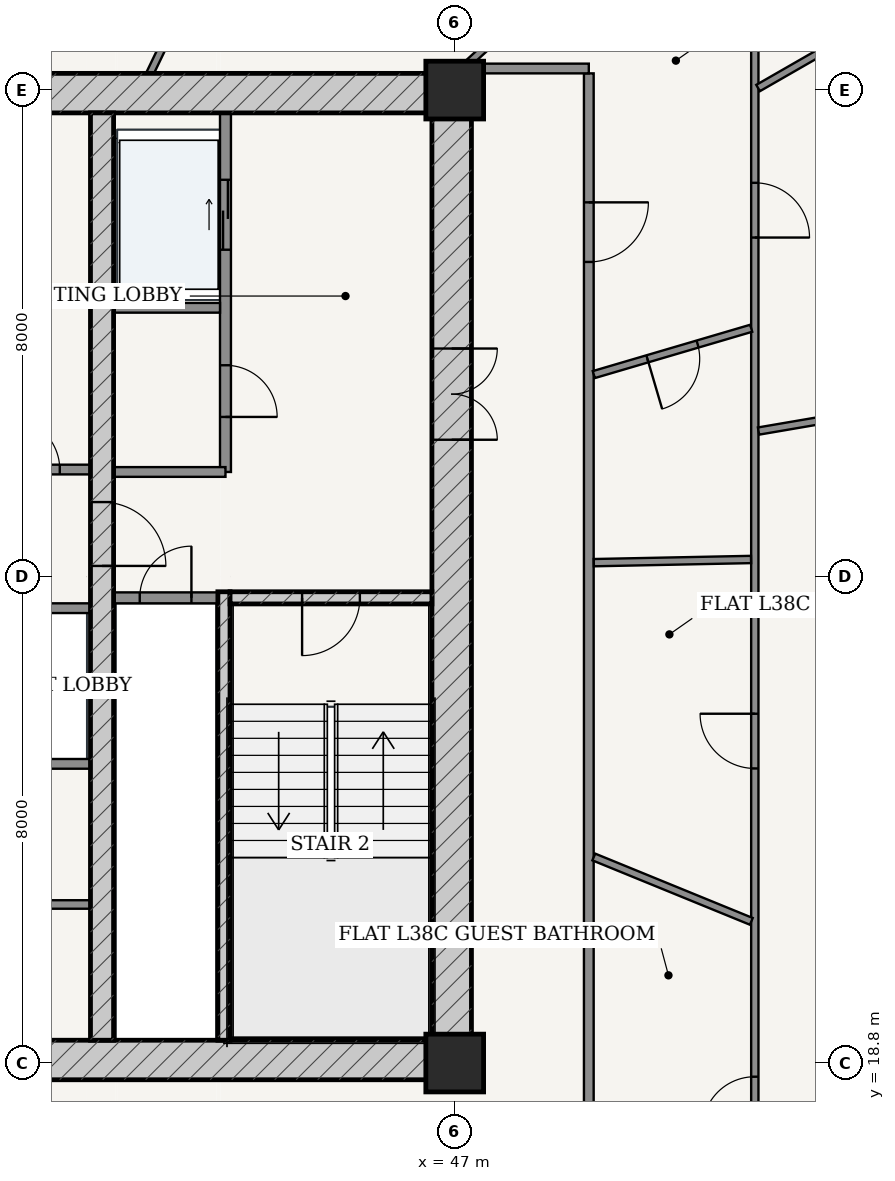
"""IFC4 building model, lengths in metres.
Left out: names, types, materials, properties, quantities, classifications, styles, units other than length and angle.
Written with IfcOpenShell. Run it as: python <this file> out.ifc"""

import sys

from ifc_helpers import new_model, si_unit, direction, frame, frame_2d, origin, origin_2d, place, context, subcontext, project, spatial, rectangle, extrude, source, transform, mapped, element, fill, save


model = new_model("IFC4")
c1 = context("Model", 3, precision=1e-05, world=origin(), true_north=direction((-0.2419218956, 0.970295726276)))
c2 = subcontext(c1, "Body", "Model", "MODEL_VIEW")
j1 = project(units=[si_unit("LENGTHUNIT", "METRE"), si_unit("PLANEANGLEUNIT", "RADIAN")], contexts=[c1])
p1 = place(None, origin())
s1 = spatial("IfcSite", under=j1, at=p1, CompositionType="ELEMENT")
p2 = place(p1, origin())
s2 = spatial("IfcBuilding", under=s1, at=p2, CompositionType="ELEMENT")
p3 = place(p2, frame((0.0, 0.0, 146.2)))
s3 = spatial("IfcBuildingStorey", under=s2, at=p3, CompositionType="ELEMENT", Elevation=146.2)
for number, where, z_axis, x_axis in (
    (1, (47.0, 18.8, 0.0), (0.0, 0.0, 1.0), (1.0, 0.0, 0.0)),
    (2, (47.0, 34.8, 0.0), (0.0, 0.0, 1.0), (1.0, 0.0, 0.0)),
):
    element("IfcColumn", number, at=place(p3, frame(where, z_axis=z_axis, x_axis=x_axis)), inside=s3, PredefinedType="COLUMN", context=c2, shape_type="SweptSolid", body=[
        extrude(rectangle(XDim=0.95, YDim=0.95, at=origin_2d()), origin(), (0.0, 0.0, 1.0), 3.6),
    ])
p4 = place(p3, frame((28.725, 18.85, 0.0), z_axis=(0.0, 0.0, 1.0), x_axis=(1.0, 0.0, 0.0)))
e3 = element("IfcWall", 3, at=p4, inside=s3, PredefinedType="SHEAR", context=c2, shape_type="SweptSolid", body=[
    extrude(rectangle(XDim=18.55, YDim=0.65, at=frame_2d((9.275, 0.0))), origin(), (0.0, 0.0, 1.0), 3.33),
])
p5 = place(p4, frame((7.51, 0.0, 0.0)))
e4 = element("IfcOpeningElement", 4, at=p5, cuts=e3, PredefinedType="OPENING", context=c2, shape_type="SweptSolid", body=[
    extrude(rectangle(XDim=0.85, YDim=2.1, at=frame_2d((0.425, 1.05))), frame((0.0, 0.335, 0.0), z_axis=(0.0, -1.0, 0.0), x_axis=(1.0, 0.0, 0.0)), (0.0, 0.0, 1.0), 0.67),
])
p6 = place(p4, frame((10.59, 0.0, 0.0)))
e5 = element("IfcOpeningElement", 5, at=p6, cuts=e3, PredefinedType="OPENING", context=c2, shape_type="SweptSolid", body=[
    extrude(rectangle(XDim=0.85, YDim=2.1, at=frame_2d((0.425, 1.05))), frame((0.0, 0.335, 0.0), z_axis=(0.0, -1.0, 0.0), x_axis=(1.0, 0.0, 0.0)), (0.0, 0.0, 1.0), 0.67),
])
p7 = place(p3, frame((28.725, 34.75, 0.0), z_axis=(0.0, 0.0, 1.0), x_axis=(1.0, 0.0, 0.0)))
e6 = element("IfcWall", 6, at=p7, inside=s3, PredefinedType="SHEAR", context=c2, shape_type="SweptSolid", body=[
    extrude(rectangle(XDim=18.55, YDim=0.65, at=frame_2d((9.275, 0.0))), origin(), (0.0, 0.0, 1.0), 3.33),
])
p8 = place(p3, frame((46.95, 19.175, 0.0), z_axis=(0.0, 0.0, 1.0), x_axis=(0.0, 1.0, 0.0)))
e7 = element("IfcWall", 7, at=p8, inside=s3, PredefinedType="SHEAR", context=c2, shape_type="SweptSolid", body=[
    extrude(rectangle(XDim=15.25, YDim=0.65, at=frame_2d((7.625, 0.0))), origin(), (0.0, 0.0, 1.0), 3.33),
])
p9 = place(p8, frame((9.875, 0.0, 0.0)))
e8 = element("IfcOpeningElement", 8, at=p9, cuts=e7, PredefinedType="OPENING", context=c2, shape_type="SweptSolid", body=[
    extrude(rectangle(XDim=1.5, YDim=2.2, at=frame_2d((0.75, 1.1))), frame((0.0, 0.335, 0.0), z_axis=(0.0, -1.0, 0.0), x_axis=(1.0, 0.0, 0.0)), (0.0, 0.0, 1.0), 0.67),
])
p10 = place(p3, frame((43.205, 19.175, 0.0), z_axis=(0.0, 0.0, 1.0), x_axis=(0.0, 1.0, 0.0)))
e9 = element("IfcWall", 9, at=p10, inside=s3, PredefinedType="SOLIDWALL", context=c2, shape_type="SweptSolid", body=[
    extrude(rectangle(XDim=7.375, YDim=0.2, at=frame_2d((3.688, 0.0))), origin(), (0.0, 0.0, 1.0), 3.33),
])
p11 = place(p3, frame((43.305, 26.45, 0.0), z_axis=(0.0, 0.0, 1.0), x_axis=(1.0, 0.0, 0.0)))
e10 = element("IfcWall", 10, at=p11, inside=s3, PredefinedType="SOLIDWALL", context=c2, shape_type="SweptSolid", body=[
    extrude(rectangle(XDim=3.32, YDim=0.2, at=frame_2d((1.66, 0.0))), origin(), (0.0, 0.0, 1.0), 3.33),
])
p12 = place(p11, frame((1.185, 0.0, 0.0)))
e11 = element("IfcOpeningElement", 11, at=p12, cuts=e10, PredefinedType="OPENING", context=c2, shape_type="SweptSolid", body=[
    extrude(rectangle(XDim=0.95, YDim=2.15, at=frame_2d((0.475, 1.075))), frame((0.0, 0.11, 0.0), z_axis=(0.0, -1.0, 0.0), x_axis=(1.0, 0.0, 0.0)), (0.0, 0.0, 1.0), 0.22),
])
p13 = place(p3, frame((41.2, 19.175, 0.0), z_axis=(0.0, 0.0, 1.0), x_axis=(0.0, 1.0, 0.0)))
e12 = element("IfcWall", 12, at=p13, inside=s3, PredefinedType="SHEAR", context=c2, shape_type="SweptSolid", body=[
    extrude(rectangle(XDim=15.25, YDim=0.38, at=frame_2d((7.625, 0.0))), origin(), (0.0, 0.0, 1.0), 3.33),
])
p14 = place(p13, frame((7.8, 0.0, 0.0)))
e13 = element("IfcOpeningElement", 13, at=p14, cuts=e12, PredefinedType="OPENING", context=c2, shape_type="SweptSolid", body=[
    extrude(rectangle(XDim=1.05, YDim=2.15, at=frame_2d((0.525, 1.075))), frame((0.0, 0.2, 0.0), z_axis=(0.0, -1.0, 0.0), x_axis=(1.0, 0.0, 0.0)), (0.0, 0.0, 1.0), 0.4),
])
p15 = place(p3, frame((41.39, 26.45, 0.0), z_axis=(0.0, 0.0, 1.0), x_axis=(1.0, 0.0, 0.0)))
e14 = element("IfcWall", 14, at=p15, inside=s3, PredefinedType="PARTITIONING", context=c2, shape_type="SweptSolid", body=[
    extrude(rectangle(XDim=1.71, YDim=0.18, at=frame_2d((0.855, 0.0))), origin(), (0.0, 0.0, 1.0), 3.33),
])
p16 = place(p15, frame((0.43, 0.0, 0.0)))
e15 = element("IfcOpeningElement", 15, at=p16, cuts=e14, PredefinedType="OPENING", context=c2, shape_type="SweptSolid", body=[
    extrude(rectangle(XDim=0.85, YDim=2.1, at=frame_2d((0.425, 1.05))), frame((0.0, 0.1, 0.0), z_axis=(0.0, -1.0, 0.0), x_axis=(1.0, 0.0, 0.0)), (0.0, 0.0, 1.0), 0.2),
])
p17 = place(p3, frame((43.23, 28.52, 0.0), z_axis=(0.0, 0.0, 1.0), x_axis=(0.0, 1.0, 0.0)))
e16 = element("IfcWall", 16, at=p17, inside=s3, PredefinedType="PARTITIONING", context=c2, shape_type="SweptSolid", body=[
    extrude(rectangle(XDim=5.905, YDim=0.18, at=frame_2d((2.953, 0.0))), origin(), (0.0, 0.0, 1.0), 3.33),
])
p18 = place(p17, frame((0.905, 0.0, 0.0)))
e17 = element("IfcOpeningElement", 17, at=p18, cuts=e16, PredefinedType="OPENING", context=c2, shape_type="SweptSolid", body=[
    extrude(rectangle(XDim=0.85, YDim=2.1, at=frame_2d((0.425, 1.05))), frame((0.0, 0.1, 0.0), z_axis=(0.0, -1.0, 0.0), x_axis=(1.0, 0.0, 0.0)), (0.0, 0.0, 1.0), 0.2),
])
p19 = place(p17, frame((3.655, 0.0, 0.0)))
e18 = element("IfcOpeningElement", 18, at=p19, cuts=e16, PredefinedType="OPENING", context=c2, shape_type="SweptSolid", body=[
    extrude(rectangle(XDim=1.15, YDim=2.2, at=frame_2d((0.575, 1.1))), frame((0.0, 0.1, 0.0), z_axis=(0.0, -1.0, 0.0), x_axis=(1.0, 0.0, 0.0)), (0.0, 0.0, 1.0), 0.2),
])
p20 = place(p3, frame((41.39, 31.22, 0.0), z_axis=(0.0, 0.0, 1.0), x_axis=(1.0, 0.0, 0.0)))
e19 = element("IfcWall", 19, at=p20, inside=s3, PredefinedType="PARTITIONING", context=c2, shape_type="SweptSolid", body=[
    extrude(rectangle(XDim=1.75, YDim=0.16, at=frame_2d((0.875, 0.0))), origin(), (0.0, 0.0, 1.0), 3.33),
])
p21 = place(p3, frame((41.39, 28.52, 0.0), z_axis=(0.0, 0.0, 1.0), x_axis=(1.0, 0.0, 0.0)))
e20 = element("IfcWall", 20, at=p21, inside=s3, PredefinedType="PARTITIONING", context=c2, shape_type="SweptSolid", body=[
    extrude(rectangle(XDim=1.84, YDim=0.16, at=frame_2d((0.92, 0.0))), origin(), (0.0, 0.0, 1.0), 3.33),
])
p22 = place(p3, frame((34.99, 28.56, 0.0), z_axis=(0.0, 0.0, 1.0), x_axis=(1.0, 0.0, 0.0)))
e21 = element("IfcWall", 21, at=p22, inside=s3, PredefinedType="PARTITIONING", context=c2, shape_type="SweptSolid", body=[
    extrude(rectangle(XDim=6.02, YDim=0.16, at=frame_2d((3.01, 0.0))), origin(), (0.0, 0.0, 1.0), 3.33),
])
p23 = place(p22, frame((0.505, 0.0, 0.0)))
e22 = element("IfcOpeningElement", 22, at=p23, cuts=e21, PredefinedType="OPENING", context=c2, shape_type="SweptSolid", body=[
    extrude(rectangle(XDim=0.85, YDim=2.1, at=frame_2d((0.425, 1.05))), frame((0.0, 0.09, 0.0), z_axis=(0.0, -1.0, 0.0), x_axis=(1.0, 0.0, 0.0)), (0.0, 0.0, 1.0), 0.18),
])
p24 = place(p22, frame((2.58, 0.0, 0.0)))
e23 = element("IfcOpeningElement", 23, at=p24, cuts=e21, PredefinedType="OPENING", context=c2, shape_type="SweptSolid", body=[
    extrude(rectangle(XDim=0.86, YDim=2.1, at=frame_2d((0.43, 1.05))), frame((0.0, 0.09, 0.0), z_axis=(0.0, -1.0, 0.0), x_axis=(1.0, 0.0, 0.0)), (0.0, 0.0, 1.0), 0.18),
])
p25 = place(p22, frame((4.665, 0.0, 0.0)))
e24 = element("IfcOpeningElement", 24, at=p25, cuts=e21, PredefinedType="OPENING", context=c2, shape_type="SweptSolid", body=[
    extrude(rectangle(XDim=0.85, YDim=2.1, at=frame_2d((0.425, 1.05))), frame((0.0, 0.09, 0.0), z_axis=(0.0, -1.0, 0.0), x_axis=(1.0, 0.0, 0.0)), (0.0, 0.0, 1.0), 0.18),
])
p26 = place(p3, frame((34.99, 26.28, 0.0), z_axis=(0.0, 0.0, 1.0), x_axis=(1.0, 0.0, 0.0)))
e25 = element("IfcWall", 25, at=p26, inside=s3, PredefinedType="PARTITIONING", context=c2, shape_type="SweptSolid", body=[
    extrude(rectangle(XDim=6.02, YDim=0.16, at=frame_2d((3.01, 0.0))), origin(), (0.0, 0.0, 1.0), 3.33),
])
p27 = place(p26, frame((0.225, 0.0, 0.0)))
e26 = element("IfcOpeningElement", 26, at=p27, cuts=e25, PredefinedType="OPENING", context=c2, shape_type="SweptSolid", body=[
    extrude(rectangle(XDim=1.1, YDim=2.2, at=frame_2d((0.55, 1.1))), frame((0.0, 0.09, 0.0), z_axis=(0.0, -1.0, 0.0), x_axis=(1.0, 0.0, 0.0)), (0.0, 0.0, 1.0), 0.18),
])
p28 = place(p26, frame((1.705, 0.0, 0.0)))
e27 = element("IfcOpeningElement", 27, at=p28, cuts=e25, PredefinedType="OPENING", context=c2, shape_type="SweptSolid", body=[
    extrude(rectangle(XDim=1.1, YDim=2.2, at=frame_2d((0.55, 1.1))), frame((0.0, 0.09, 0.0), z_axis=(0.0, -1.0, 0.0), x_axis=(1.0, 0.0, 0.0)), (0.0, 0.0, 1.0), 0.18),
])
p29 = place(p3, frame((34.99, 23.72, 0.0), z_axis=(0.0, 0.0, 1.0), x_axis=(1.0, 0.0, 0.0)))
e28 = element("IfcWall", 28, at=p29, inside=s3, PredefinedType="PARTITIONING", context=c2, shape_type="SweptSolid", body=[
    extrude(rectangle(XDim=6.02, YDim=0.16, at=frame_2d((3.01, 0.0))), origin(), (0.0, 0.0, 1.0), 3.33),
])
p30 = place(p3, frame((38.4, 21.407, 0.0), z_axis=(0.0, 0.0, 1.0), x_axis=(1.0, 0.0, 0.0)))
e29 = element("IfcWall", 29, at=p30, inside=s3, PredefinedType="PARTITIONING", context=c2, shape_type="SweptSolid", body=[
    extrude(rectangle(XDim=2.61, YDim=0.14, at=frame_2d((1.305, 0.0))), origin(), (0.0, 0.0, 1.0), 3.33),
])
p31 = place(p30, frame((0.88, 0.0, 0.0)))
e30 = element("IfcOpeningElement", 30, at=p31, cuts=e29, PredefinedType="OPENING", context=c2, shape_type="SweptSolid", body=[
    extrude(rectangle(XDim=0.85, YDim=2.1, at=frame_2d((0.425, 1.05))), frame((0.0, 0.08, 0.0), z_axis=(0.0, -1.0, 0.0), x_axis=(1.0, 0.0, 0.0)), (0.0, 0.0, 1.0), 0.16),
])
p32 = place(p3, frame((49.205, 16.675, 0.0), z_axis=(0.0, 0.0, 1.0), x_axis=(0.0, 1.0, 0.0)))
e31 = element("IfcWall", 31, at=p32, inside=s3, PredefinedType="PARTITIONING", context=c2, shape_type="SweptSolid", body=[
    extrude(rectangle(XDim=18.4, YDim=0.16, at=frame_2d((9.2, 0.0))), origin(), (0.0, 0.0, 1.0), 2.776),
])
p33 = place(p32, frame((15.299, 0.0, 0.0)))
e32 = element("IfcOpeningElement", 32, at=p33, cuts=e31, PredefinedType="OPENING", context=c2, shape_type="SweptSolid", body=[
    extrude(rectangle(XDim=0.98, YDim=2.2, at=frame_2d((0.49, 1.1))), frame((0.0, 0.09, 0.0), z_axis=(0.0, -1.0, 0.0), x_axis=(1.0, 0.0, 0.0)), (0.0, 0.0, 1.0), 0.18),
])
p34 = place(p3, frame((47.275, 35.155, 0.0), z_axis=(0.0, 0.0, 1.0), x_axis=(1.0, 0.0, 0.0)))
e33 = element("IfcWall", 33, at=p34, inside=s3, PredefinedType="PARTITIONING", context=c2, shape_type="SweptSolid", body=[
    extrude(rectangle(XDim=1.93, YDim=0.16, at=frame_2d((0.965, 0.0))), origin(), (0.0, 0.0, 1.0), 2.776),
])
p35 = place(p3, frame((51.935, 37.885, 0.0), z_axis=(0.0, 0.0, 1.0), x_axis=(0.0, -1.0, 0.0)))
e34 = element("IfcWall", 34, at=p35, inside=s3, PredefinedType="PARTITIONING", context=c2, shape_type="SweptSolid", body=[
    extrude(rectangle(XDim=22.96, YDim=0.12, at=frame_2d((11.48, 0.0))), origin(), (0.0, 0.0, 1.0), 2.776),
])
p36 = place(p35, frame((4.61, 0.0, 0.0)))
e35 = element("IfcOpeningElement", 35, at=p36, cuts=e34, PredefinedType="OPENING", context=c2, shape_type="SweptSolid", body=[
    extrude(rectangle(XDim=0.9, YDim=2.15, at=frame_2d((0.45, 1.075))), frame((0.0, 0.07, 0.0), z_axis=(0.0, -1.0, 0.0), x_axis=(1.0, 0.0, 0.0)), (0.0, 0.0, 1.0), 0.14),
])
p37 = place(p35, frame((19.31, 0.0, 0.0)))
e36 = element("IfcOpeningElement", 36, at=p37, cuts=e34, PredefinedType="OPENING", context=c2, shape_type="SweptSolid", body=[
    extrude(rectangle(XDim=0.86, YDim=2.15, at=frame_2d((0.43, 1.075))), frame((0.0, 0.07, 0.0), z_axis=(0.0, -1.0, 0.0), x_axis=(1.0, 0.0, 0.0)), (0.0, 0.0, 1.0), 0.14),
])
p38 = place(p35, frame((13.341, 0.0, 0.0)))
e37 = element("IfcOpeningElement", 37, at=p38, cuts=e34, PredefinedType="OPENING", context=c2, shape_type="SweptSolid", body=[
    extrude(rectangle(XDim=0.9, YDim=2.15, at=frame_2d((0.45, 1.075))), frame((0.0, 0.07, 0.0), z_axis=(0.0, -1.0, 0.0), x_axis=(1.0, 0.0, 0.0)), (0.0, 0.0, 1.0), 0.14),
])
p39 = place(p3, frame((51.996, 29.193, 0.0), z_axis=(0.0, 0.0, 1.0), x_axis=(0.985698378271, 0.168519159369, 0.0)))
e38 = element("IfcWall", 38, at=p39, inside=s3, PredefinedType="PARTITIONING", context=c2, shape_type="SweptSolid", body=[
    extrude(rectangle(XDim=9.769, YDim=0.12, at=frame_2d((4.884, 0.0))), origin(), (0.0, 0.0, 1.0), 2.776),
])
p40 = place(p39, frame((3.428, 0.0, 0.0)))
e39 = element("IfcOpeningElement", 39, at=p40, cuts=e38, PredefinedType="OPENING", context=c2, shape_type="SweptSolid", body=[
    extrude(rectangle(XDim=0.9, YDim=2.15, at=frame_2d((0.45, 1.075))), frame((0.0, 0.07, 0.0), z_axis=(0.0, -1.0, 0.0), x_axis=(1.0, 0.0, 0.0)), (0.0, 0.0, 1.0), 0.14),
])
p41 = place(p3, frame((51.989, 34.834, 0.0), z_axis=(0.0, 0.0, 1.0), x_axis=(0.86717064002, 0.498011125466, 0.0)))
e40 = element("IfcWall", 40, at=p41, inside=s3, PredefinedType="PARTITIONING", context=c2, shape_type="SweptSolid", body=[
    extrude(rectangle(XDim=6.961, YDim=0.12, at=frame_2d((3.48, 0.0))), origin(), (0.0, 0.0, 1.0), 2.776),
])
p42 = place(p3, frame((49.287, 22.188, 0.0), z_axis=(0.0, 0.0, 1.0), x_axis=(0.925708058909, -0.378238799796, 0.0)))
e41 = element("IfcWall", 41, at=p42, inside=s3, PredefinedType="PARTITIONING", context=c2, shape_type="SweptSolid", body=[
    extrude(rectangle(XDim=2.799, YDim=0.12, at=frame_2d((1.399, 0.0))), origin(), (0.0, 0.0, 1.0), 3.33),
])
p43 = place(p3, frame((49.287, 27.029, 0.0), z_axis=(0.0, 0.0, 1.0), x_axis=(0.999794052369, 0.020294157974, 0.0)))
e42 = element("IfcWall", 42, at=p43, inside=s3, PredefinedType="PARTITIONING", context=c2, shape_type="SweptSolid", body=[
    extrude(rectangle(XDim=2.586, YDim=0.12, at=frame_2d((1.293, 0.0))), origin(), (0.0, 0.0, 1.0), 3.33),
])
p44 = place(p3, frame((49.287, 30.121, 0.0), z_axis=(0.0, 0.0, 1.0), x_axis=(0.959304970846, 0.282372046969, 0.0)))
e43 = element("IfcWall", 43, at=p44, inside=s3, PredefinedType="PARTITIONING", context=c2, shape_type="SweptSolid", body=[
    extrude(rectangle(XDim=2.698, YDim=0.12, at=frame_2d((1.349, 0.0))), origin(), (0.0, 0.0, 1.0), 3.33),
])
p45 = place(p44, frame((0.919, 0.0, 0.0)))
e44 = element("IfcOpeningElement", 44, at=p45, cuts=e43, PredefinedType="OPENING", context=c2, shape_type="SweptSolid", body=[
    extrude(rectangle(XDim=0.86, YDim=2.15, at=frame_2d((0.43, 1.075))), frame((0.0, 0.07, 0.0), z_axis=(0.0, -1.0, 0.0), x_axis=(1.0, 0.0, 0.0)), (0.0, 0.0, 1.0), 0.14),
])
p46 = place(p3, frame((47.216, 35.235, 0.0), z_axis=(0.0, 0.0, 1.0), x_axis=(0.73766811085, 0.675163504816, 0.0)))
e45 = element("IfcWall", 45, at=p46, inside=s3, PredefinedType="PARTITIONING", context=c2, shape_type="SweptSolid", body=[
    extrude(rectangle(XDim=3.863, YDim=0.12, at=frame_2d((1.932, 0.0))), origin(), (0.0, 0.0, 1.0), 2.776),
])
p47 = place(p46, frame((1.481, 0.0, 0.0)))
e46 = element("IfcOpeningElement", 46, at=p47, cuts=e45, PredefinedType="OPENING", context=c2, shape_type="SweptSolid", body=[
    extrude(rectangle(XDim=0.9, YDim=2.15, at=frame_2d((0.45, 1.075))), frame((0.0, 0.07, 0.0), z_axis=(0.0, -1.0, 0.0), x_axis=(1.0, 0.0, 0.0)), (0.0, 0.0, 1.0), 0.14),
])
p48 = place(p3, frame((41.988, 35.075, 0.0), z_axis=(0.0, 0.0, 1.0), x_axis=(0.434144408634, 0.900843289619, 0.0)))
e47 = element("IfcWall", 47, at=p48, inside=s3, PredefinedType="PARTITIONING", context=c2, shape_type="SweptSolid", body=[
    extrude(rectangle(XDim=2.88, YDim=0.12, at=frame_2d((1.44, 0.0))), origin(), (0.0, 0.0, 1.0), 3.33),
])
m1 = source(origin(), c2, "Body", "SweptSolid", [
    extrude(rectangle(XDim=1.5, YDim=2.2, at=frame_2d((0.75, 1.1))), frame((0.0, 0.025, 0.0), z_axis=(0.0, -1.0, 0.0), x_axis=(1.0, 0.0, 0.0)), (0.0, 0.0, 1.0), 0.05),
])
p49 = place(p9, frame((1.5, 0.0, 0.0), z_axis=(0.0, 0.0, 1.0), x_axis=(-1.0, 0.0, 0.0)))
e48 = element("IfcDoor", 48, at=p49, inside=s3, OperationType="DOUBLE_DOOR_SINGLE_SWING", PredefinedType="DOOR", context=c2, shape_type="MappedRepresentation", body=[
    mapped(m1, transform((0.0, 0.0, 0.0), scale=1.0)),
])
fill(e8, e48)
m2 = source(origin(), c2, "Body", "SweptSolid", [
    extrude(rectangle(XDim=1.05, YDim=2.15, at=frame_2d((0.525, 1.075))), frame((0.0, 0.025, 0.0), z_axis=(0.0, -1.0, 0.0), x_axis=(1.0, 0.0, 0.0)), (0.0, 0.0, 1.0), 0.05),
])
p50 = place(p14, frame((1.05, 0.0, 0.0), z_axis=(0.0, 0.0, 1.0), x_axis=(-1.0, 0.0, 0.0)))
e49 = element("IfcDoor", 49, at=p50, inside=s3, OperationType="SINGLE_SWING_RIGHT", PredefinedType="DOOR", context=c2, shape_type="MappedRepresentation", body=[
    mapped(m2, transform((0.0, 0.0, 0.0), scale=1.0)),
])
fill(e13, e49)
m3 = source(origin(), c2, "Body", "SweptSolid", [
    extrude(rectangle(XDim=0.95, YDim=2.15, at=frame_2d((0.475, 1.075))), frame((0.0, 0.025, 0.0), z_axis=(0.0, -1.0, 0.0), x_axis=(1.0, 0.0, 0.0)), (0.0, 0.0, 1.0), 0.05),
])
p51 = place(p12, frame((0.95, 0.0, 0.0), z_axis=(0.0, 0.0, 1.0), x_axis=(-1.0, 0.0, 0.0)))
e50 = element("IfcDoor", 50, at=p51, inside=s3, OperationType="SINGLE_SWING_RIGHT", PredefinedType="DOOR", context=c2, shape_type="MappedRepresentation", body=[
    mapped(m3, transform((0.0, 0.0, 0.0), scale=1.0)),
])
fill(e11, e50)
m4 = source(origin(), c2, "Body", "SweptSolid", [
    extrude(rectangle(XDim=0.85, YDim=2.1, at=frame_2d((0.425, 1.05))), frame((0.0, 0.025, 0.0), z_axis=(0.0, -1.0, 0.0), x_axis=(1.0, 0.0, 0.0)), (0.0, 0.0, 1.0), 0.05),
])
p52 = place(p16, origin())
e51 = element("IfcDoor", 51, at=p52, inside=s3, OperationType="SINGLE_SWING_RIGHT", PredefinedType="DOOR", context=c2, shape_type="MappedRepresentation", body=[
    mapped(m4, transform((0.0, 0.0, 0.0), scale=1.0)),
])
fill(e15, e51)
p53 = place(p18, frame((0.85, 0.0, 0.0), z_axis=(0.0, 0.0, 1.0), x_axis=(-1.0, 0.0, 0.0)))
e52 = element("IfcDoor", 52, at=p53, inside=s3, OperationType="SINGLE_SWING_RIGHT", PredefinedType="DOOR", context=c2, shape_type="MappedRepresentation", body=[
    mapped(m4, transform((0.0, 0.0, 0.0), scale=1.0)),
])
fill(e17, e52)
p54 = place(p25, origin())
e53 = element("IfcDoor", 53, at=p54, inside=s3, OperationType="SINGLE_SWING_LEFT", PredefinedType="DOOR", context=c2, shape_type="MappedRepresentation", body=[
    mapped(m4, transform((0.0, 0.0, 0.0), scale=1.0)),
])
fill(e24, e53)
m5 = source(origin(), c2, "Body", "SweptSolid", [
    extrude(rectangle(XDim=1.15, YDim=2.2, at=frame_2d((0.575, 1.1))), frame((0.0, 0.025, 0.0), z_axis=(0.0, -1.0, 0.0), x_axis=(1.0, 0.0, 0.0)), (0.0, 0.0, 1.0), 0.05),
])
p55 = place(p19, origin())
e54 = element("IfcDoor", 54, at=p55, inside=s3, OperationType="DOUBLE_DOOR_SLIDING", PredefinedType="DOOR", context=c2, shape_type="MappedRepresentation", body=[
    mapped(m5, transform((0.0, 0.0, 0.0), scale=1.0)),
])
fill(e18, e54)
m6 = source(origin(), c2, "Body", "SweptSolid", [
    extrude(rectangle(XDim=0.98, YDim=2.2, at=frame_2d((0.49, 1.1))), frame((0.0, 0.025, 0.0), z_axis=(0.0, -1.0, 0.0), x_axis=(1.0, 0.0, 0.0)), (0.0, 0.0, 1.0), 0.05),
])
p56 = place(p33, frame((0.98, 0.0, 0.0), z_axis=(0.0, 0.0, 1.0), x_axis=(-1.0, 0.0, 0.0)))
e55 = element("IfcDoor", 55, at=p56, inside=s3, OperationType="SINGLE_SWING_LEFT", PredefinedType="DOOR", context=c2, shape_type="MappedRepresentation", body=[
    mapped(m6, transform((0.0, 0.0, 0.0), scale=1.0)),
])
fill(e32, e55)
m7 = source(origin(), c2, "Body", "SweptSolid", [
    extrude(rectangle(XDim=0.86, YDim=2.15, at=frame_2d((0.43, 1.075))), frame((0.0, 0.025, 0.0), z_axis=(0.0, -1.0, 0.0), x_axis=(1.0, 0.0, 0.0)), (0.0, 0.0, 1.0), 0.05),
])
p57 = place(p45, frame((0.86, 0.0, 0.0), z_axis=(0.0, 0.0, 1.0), x_axis=(-1.0, 0.0, 0.0)))
e56 = element("IfcDoor", 56, at=p57, inside=s3, OperationType="SINGLE_SWING_RIGHT", PredefinedType="DOOR", context=c2, shape_type="MappedRepresentation", body=[
    mapped(m7, transform((0.0, 0.0, 0.0), scale=1.0)),
])
fill(e44, e56)
m8 = source(origin(), c2, "Body", "SweptSolid", [
    extrude(rectangle(XDim=0.9, YDim=2.15, at=frame_2d((0.45, 1.075))), frame((0.0, 0.025, 0.0), z_axis=(0.0, -1.0, 0.0), x_axis=(1.0, 0.0, 0.0)), (0.0, 0.0, 1.0), 0.05),
])
p58 = place(p36, origin())
e57 = element("IfcDoor", 57, at=p58, inside=s3, OperationType="SINGLE_SWING_RIGHT", PredefinedType="DOOR", context=c2, shape_type="MappedRepresentation", body=[
    mapped(m8, transform((0.0, 0.0, 0.0), scale=1.0)),
])
fill(e35, e57)
p59 = place(p37, frame((0.86, 0.0, 0.0), z_axis=(0.0, 0.0, 1.0), x_axis=(-1.0, 0.0, 0.0)))
e58 = element("IfcDoor", 58, at=p59, inside=s3, OperationType="SINGLE_SWING_LEFT", PredefinedType="DOOR", context=c2, shape_type="MappedRepresentation", body=[
    mapped(m7, transform((0.0, 0.0, 0.0), scale=1.0)),
])
fill(e36, e58)
p60 = place(p38, frame((0.9, 0.0, 0.0), z_axis=(0.0, 0.0, 1.0), x_axis=(-1.0, 0.0, 0.0)))
e59 = element("IfcDoor", 59, at=p60, inside=s3, OperationType="SINGLE_SWING_RIGHT", PredefinedType="DOOR", context=c2, shape_type="MappedRepresentation", body=[
    mapped(m8, transform((0.0, 0.0, 0.0), scale=1.0)),
])
fill(e37, e59)
save(model, sys.argv[1])
